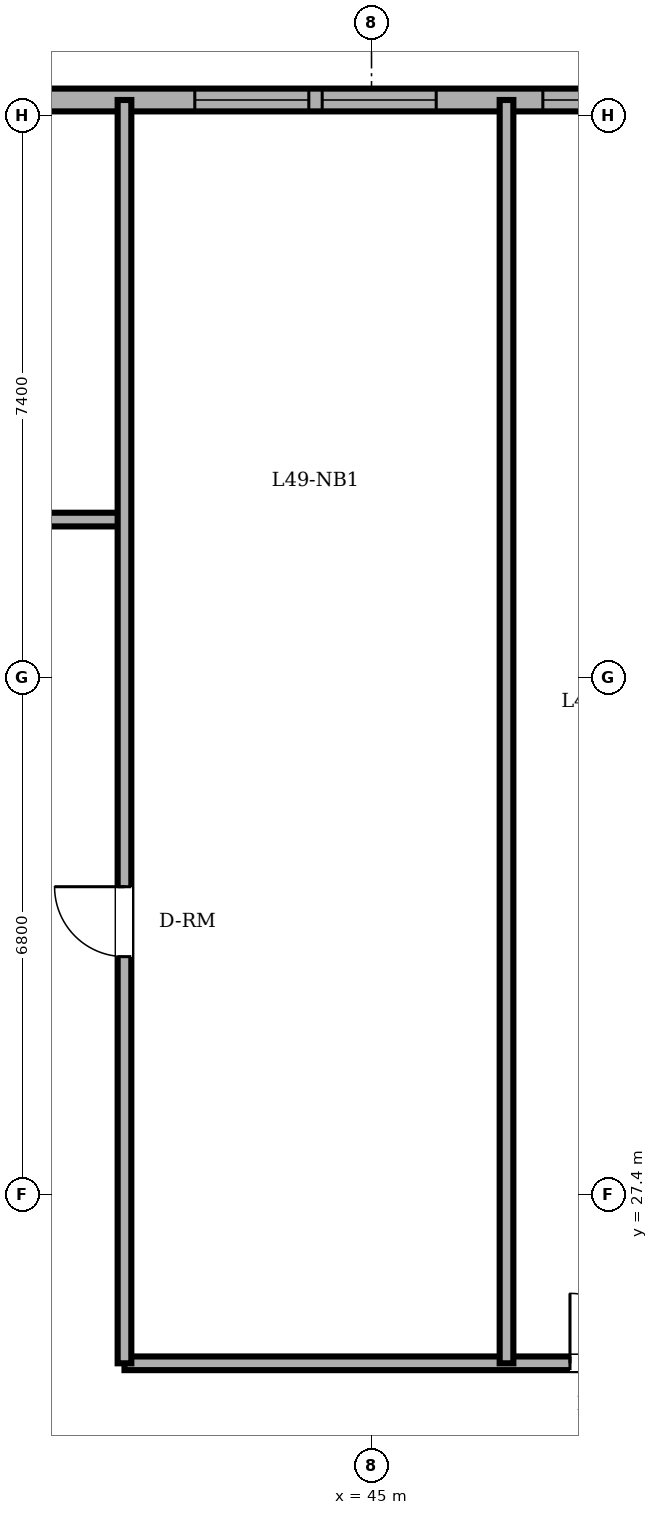
"""IFC4 building model, lengths in metres.
Left out: names, types, materials, properties, quantities, classifications, styles, units other than length and angle.
Written with IfcOpenShell. Run it as: python <this file> out.ifc"""

import sys

from ifc_helpers import new_model, si_unit, direction, frame, frame_2d, origin, place, context, subcontext, project, spatial, rectangle, extrude, element, fill, save


model = new_model("IFC4")
c1 = context("Model", 3, precision=1e-05, world=origin(), true_north=direction((0.0, 1.0)))
c2 = subcontext(c1, "Body", "Model", "MODEL_VIEW")
j1 = project(units=[si_unit("LENGTHUNIT", "METRE"), si_unit("PLANEANGLEUNIT", "RADIAN")], contexts=[c1])
p1 = place(None, origin())
s1 = spatial("IfcSite", under=j1, at=p1, CompositionType="ELEMENT")
p2 = place(p1, origin())
s2 = spatial("IfcBuilding", under=s1, at=p2, CompositionType="ELEMENT")
p3 = place(p2, frame((0.0, 0.0, 187.0)))
s3 = spatial("IfcBuildingStorey", under=s2, at=p3, CompositionType="ELEMENT", Elevation=187.0)
p4 = place(p3, frame((49.582, 41.8, 0.0), z_axis=(0.0, 0.0, 1.0), x_axis=(-1.0, 0.0, 0.0)))
e1 = element("IfcWall", 1, at=p4, inside=s3, PredefinedType="SOLIDWALL", context=c2, shape_type="SweptSolid", body=[
    extrude(rectangle(XDim=30.282, YDim=0.3, at=frame_2d((15.141, 0.0))), origin(), (0.0, 0.0, 1.0), 3.36),
])
p5 = place(p4, frame((15.707, 0.0, 0.0)))
e2 = element("IfcOpeningElement", 2, at=p5, cuts=e1, PredefinedType="OPENING", context=c2, shape_type="SweptSolid", body=[
    extrude(rectangle(XDim=0.95, YDim=2.2, at=frame_2d((0.475, 1.1))), frame((0.0, 0.16, 0.0), z_axis=(0.0, -1.0, 0.0), x_axis=(1.0, 0.0, 0.0)), (0.0, 0.0, 1.0), 0.32),
])
p6 = place(p4, frame((0.828, 0.0, 0.85)))
e3 = element("IfcOpeningElement", 3, at=p6, cuts=e1, PredefinedType="OPENING", context=c2, shape_type="SweptSolid", body=[
    extrude(rectangle(XDim=1.5, YDim=1.55, at=frame_2d((0.75, 0.775))), frame((0.0, 0.16, 0.0), z_axis=(0.0, -1.0, 0.0), x_axis=(1.0, 0.0, 0.0)), (0.0, 0.0, 1.0), 0.32),
])
p7 = place(p4, frame((3.731, 0.0, 0.85)))
e4 = element("IfcOpeningElement", 4, at=p7, cuts=e1, PredefinedType="OPENING", context=c2, shape_type="SweptSolid", body=[
    extrude(rectangle(XDim=1.5, YDim=1.55, at=frame_2d((0.75, 0.775))), frame((0.0, 0.16, 0.0), z_axis=(0.0, -1.0, 0.0), x_axis=(1.0, 0.0, 0.0)), (0.0, 0.0, 1.0), 0.32),
])
p8 = place(p4, frame((5.407, 0.0, 0.85)))
e5 = element("IfcOpeningElement", 5, at=p8, cuts=e1, PredefinedType="OPENING", context=c2, shape_type="SweptSolid", body=[
    extrude(rectangle(XDim=1.5, YDim=1.55, at=frame_2d((0.75, 0.775))), frame((0.0, 0.16, 0.0), z_axis=(0.0, -1.0, 0.0), x_axis=(1.0, 0.0, 0.0)), (0.0, 0.0, 1.0), 0.32),
])
p9 = place(p4, frame((10.399, 0.0, 0.85)))
e6 = element("IfcOpeningElement", 6, at=p9, cuts=e1, PredefinedType="OPENING", context=c2, shape_type="SweptSolid", body=[
    extrude(rectangle(XDim=1.5, YDim=1.55, at=frame_2d((0.75, 0.775))), frame((0.0, 0.16, 0.0), z_axis=(0.0, -1.0, 0.0), x_axis=(1.0, 0.0, 0.0)), (0.0, 0.0, 1.0), 0.32),
])
p10 = place(p4, frame((13.715, 0.0, 0.85)))
e7 = element("IfcOpeningElement", 7, at=p10, cuts=e1, PredefinedType="OPENING", context=c2, shape_type="SweptSolid", body=[
    extrude(rectangle(XDim=1.5, YDim=1.55, at=frame_2d((0.75, 0.775))), frame((0.0, 0.16, 0.0), z_axis=(0.0, -1.0, 0.0), x_axis=(1.0, 0.0, 0.0)), (0.0, 0.0, 1.0), 0.32),
])
p11 = place(p4, frame((18.932, 0.0, 0.85)))
e8 = element("IfcOpeningElement", 8, at=p11, cuts=e1, PredefinedType="OPENING", context=c2, shape_type="SweptSolid", body=[
    extrude(rectangle(XDim=1.5, YDim=1.55, at=frame_2d((0.75, 0.775))), frame((0.0, 0.16, 0.0), z_axis=(0.0, -1.0, 0.0), x_axis=(1.0, 0.0, 0.0)), (0.0, 0.0, 1.0), 0.32),
])
p12 = place(p4, frame((22.532, 0.0, 0.85)))
e9 = element("IfcOpeningElement", 9, at=p12, cuts=e1, PredefinedType="OPENING", context=c2, shape_type="SweptSolid", body=[
    extrude(rectangle(XDim=1.5, YDim=1.55, at=frame_2d((0.75, 0.775))), frame((0.0, 0.16, 0.0), z_axis=(0.0, -1.0, 0.0), x_axis=(1.0, 0.0, 0.0)), (0.0, 0.0, 1.0), 0.32),
])
p13 = place(p4, frame((25.882, 0.0, 0.85)))
e10 = element("IfcOpeningElement", 10, at=p13, cuts=e1, PredefinedType="OPENING", context=c2, shape_type="SweptSolid", body=[
    extrude(rectangle(XDim=1.5, YDim=1.55, at=frame_2d((0.75, 0.775))), frame((0.0, 0.16, 0.0), z_axis=(0.0, -1.0, 0.0), x_axis=(1.0, 0.0, 0.0)), (0.0, 0.0, 1.0), 0.32),
])
p14 = place(p4, frame((27.532, 0.0, 0.85)))
e11 = element("IfcOpeningElement", 11, at=p14, cuts=e1, PredefinedType="OPENING", context=c2, shape_type="SweptSolid", body=[
    extrude(rectangle(XDim=1.5, YDim=1.55, at=frame_2d((0.75, 0.775))), frame((0.0, 0.16, 0.0), z_axis=(0.0, -1.0, 0.0), x_axis=(1.0, 0.0, 0.0)), (0.0, 0.0, 1.0), 0.32),
])
p15 = place(p3, frame((41.75, 25.18, 0.0), z_axis=(0.0, 0.0, 1.0), x_axis=(1.0, 0.0, 0.0)))
e12 = element("IfcWall", 12, at=p15, inside=s3, PredefinedType="PARTITIONING", context=c2, shape_type="SweptSolid", body=[
    extrude(rectangle(XDim=21.25, YDim=0.18, at=frame_2d((10.625, 0.0))), origin(), (0.0, 0.0, 1.0), 3.36),
])
p16 = place(p15, frame((5.861, 0.0, 0.0)))
e13 = element("IfcOpeningElement", 13, at=p16, cuts=e12, PredefinedType="OPENING", context=c2, shape_type="SweptSolid", body=[
    extrude(rectangle(XDim=0.92, YDim=2.1, at=frame_2d((0.46, 1.05))), frame((0.0, 0.1, 0.0), z_axis=(0.0, -1.0, 0.0), x_axis=(1.0, 0.0, 0.0)), (0.0, 0.0, 1.0), 0.2),
])
p17 = place(p15, frame((9.06, 0.0, 0.0)))
e14 = element("IfcOpeningElement", 14, at=p17, cuts=e12, PredefinedType="OPENING", context=c2, shape_type="SweptSolid", body=[
    extrude(rectangle(XDim=0.92, YDim=2.1, at=frame_2d((0.46, 1.05))), frame((0.0, 0.1, 0.0), z_axis=(0.0, -1.0, 0.0), x_axis=(1.0, 0.0, 0.0)), (0.0, 0.0, 1.0), 0.2),
])
p18 = place(p15, frame((13.477, 0.0, 0.0)))
e15 = element("IfcOpeningElement", 15, at=p18, cuts=e12, PredefinedType="OPENING", context=c2, shape_type="SweptSolid", body=[
    extrude(rectangle(XDim=0.92, YDim=2.1, at=frame_2d((0.46, 1.05))), frame((0.0, 0.1, 0.0), z_axis=(0.0, -1.0, 0.0), x_axis=(1.0, 0.0, 0.0)), (0.0, 0.0, 1.0), 0.2),
])
p19 = place(p3, frame((13.8, 36.28, 0.0), z_axis=(0.0, 0.0, 1.0), x_axis=(1.0, 0.0, 0.0)))
e16 = element("IfcWall", 16, at=p19, inside=s3, PredefinedType="PARTITIONING", context=c2, shape_type="SweptSolid", body=[
    extrude(rectangle(XDim=27.95, YDim=0.18, at=frame_2d((13.975, 0.0))), origin(), (0.0, 0.0, 1.0), 3.36),
])
p20 = place(p19, frame((12.05, 0.0, 0.0)))
e17 = element("IfcOpeningElement", 17, at=p20, cuts=e16, PredefinedType="OPENING", context=c2, shape_type="SweptSolid", body=[
    extrude(rectangle(XDim=0.9, YDim=2.1, at=frame_2d((0.45, 1.05))), frame((0.0, 0.1, 0.0), z_axis=(0.0, -1.0, 0.0), x_axis=(1.0, 0.0, 0.0)), (0.0, 0.0, 1.0), 0.2),
])
p21 = place(p19, frame((15.67, 0.0, 0.0)))
e18 = element("IfcOpeningElement", 18, at=p21, cuts=e16, PredefinedType="OPENING", context=c2, shape_type="SweptSolid", body=[
    extrude(rectangle(XDim=0.86, YDim=2.1, at=frame_2d((0.43, 1.05))), frame((0.0, 0.1, 0.0), z_axis=(0.0, -1.0, 0.0), x_axis=(1.0, 0.0, 0.0)), (0.0, 0.0, 1.0), 0.2),
])
p22 = place(p19, frame((5.54, 0.0, 0.0)))
e19 = element("IfcOpeningElement", 19, at=p22, cuts=e16, PredefinedType="OPENING", context=c2, shape_type="SweptSolid", body=[
    extrude(rectangle(XDim=0.92, YDim=2.1, at=frame_2d((0.46, 1.05))), frame((0.0, 0.1, 0.0), z_axis=(0.0, -1.0, 0.0), x_axis=(1.0, 0.0, 0.0)), (0.0, 0.0, 1.0), 0.2),
])
p23 = place(p19, frame((22.255, 0.0, 0.0)))
e20 = element("IfcOpeningElement", 20, at=p23, cuts=e16, PredefinedType="OPENING", context=c2, shape_type="SweptSolid", body=[
    extrude(rectangle(XDim=0.92, YDim=2.1, at=frame_2d((0.46, 1.05))), frame((0.0, 0.1, 0.0), z_axis=(0.0, -1.0, 0.0), x_axis=(1.0, 0.0, 0.0)), (0.0, 0.0, 1.0), 0.2),
])
p24 = place(p3, frame((41.75, 25.18, 0.0), z_axis=(0.0, 0.0, 1.0), x_axis=(0.0, 1.0, 0.0)))
e21 = element("IfcWall", 21, at=p24, inside=s3, PredefinedType="PARTITIONING", context=c2, shape_type="SweptSolid", body=[
    extrude(rectangle(XDim=16.62, YDim=0.18, at=frame_2d((8.31, 0.0))), origin(), (0.0, 0.0, 1.0), 3.36),
])
p25 = place(p24, frame((5.35, 0.0, 0.0)))
e22 = element("IfcOpeningElement", 22, at=p25, cuts=e21, PredefinedType="OPENING", context=c2, shape_type="SweptSolid", body=[
    extrude(rectangle(XDim=0.92, YDim=2.1, at=frame_2d((0.46, 1.05))), frame((0.0, 0.1, 0.0), z_axis=(0.0, -1.0, 0.0), x_axis=(1.0, 0.0, 0.0)), (0.0, 0.0, 1.0), 0.2),
])
p26 = place(p3, frame((46.776, 25.18, 0.0), z_axis=(0.0, 0.0, 1.0), x_axis=(0.0, 1.0, 0.0)))
e23 = element("IfcWall", 23, at=p26, inside=s3, PredefinedType="PARTITIONING", context=c2, shape_type="SweptSolid", body=[
    extrude(rectangle(XDim=16.62, YDim=0.18, at=frame_2d((8.31, 0.0))), origin(), (0.0, 0.0, 1.0), 3.36),
])
p27 = place(p6, origin())
e24 = element("IfcWindow", 24, at=p27, inside=s3, PartitioningType="DOUBLE_PANEL_VERTICAL", PredefinedType="WINDOW", context=c2, shape_type="SweptSolid", body=[
    extrude(rectangle(XDim=1.5, YDim=1.55, at=frame_2d((0.75, 0.775))), frame((0.0, 0.03, 0.0), z_axis=(0.0, -1.0, 0.0), x_axis=(1.0, 0.0, 0.0)), (0.0, 0.0, 1.0), 0.06),
])
fill(e3, e24)
p28 = place(p7, origin())
e25 = element("IfcWindow", 25, at=p28, inside=s3, PartitioningType="DOUBLE_PANEL_VERTICAL", PredefinedType="WINDOW", context=c2, shape_type="SweptSolid", body=[
    extrude(rectangle(XDim=1.5, YDim=1.55, at=frame_2d((0.75, 0.775))), frame((0.0, 0.03, 0.0), z_axis=(0.0, -1.0, 0.0), x_axis=(1.0, 0.0, 0.0)), (0.0, 0.0, 1.0), 0.06),
])
fill(e4, e25)
p29 = place(p8, origin())
e26 = element("IfcWindow", 26, at=p29, inside=s3, PartitioningType="DOUBLE_PANEL_VERTICAL", PredefinedType="WINDOW", context=c2, shape_type="SweptSolid", body=[
    extrude(rectangle(XDim=1.5, YDim=1.55, at=frame_2d((0.75, 0.775))), frame((0.0, 0.03, 0.0), z_axis=(0.0, -1.0, 0.0), x_axis=(1.0, 0.0, 0.0)), (0.0, 0.0, 1.0), 0.06),
])
fill(e5, e26)
p30 = place(p25, origin())
e27 = element("IfcDoor", 27, at=p30, inside=s3, OperationType="SINGLE_SWING_RIGHT", PredefinedType="DOOR", context=c2, shape_type="SweptSolid", body=[
    extrude(rectangle(XDim=0.92, YDim=2.1, at=frame_2d((0.46, 1.05))), frame((0.0, 0.025, 0.0), z_axis=(0.0, -1.0, 0.0), x_axis=(1.0, 0.0, 0.0)), (0.0, 0.0, 1.0), 0.05),
])
fill(e22, e27)
p31 = place(p16, origin())
e28 = element("IfcDoor", 28, at=p31, inside=s3, OperationType="SINGLE_SWING_LEFT", PredefinedType="DOOR", context=c2, shape_type="SweptSolid", body=[
    extrude(rectangle(XDim=0.92, YDim=2.1, at=frame_2d((0.46, 1.05))), frame((0.0, 0.025, 0.0), z_axis=(0.0, -1.0, 0.0), x_axis=(1.0, 0.0, 0.0)), (0.0, 0.0, 1.0), 0.05),
])
fill(e13, e28)
save(model, sys.argv[1])
